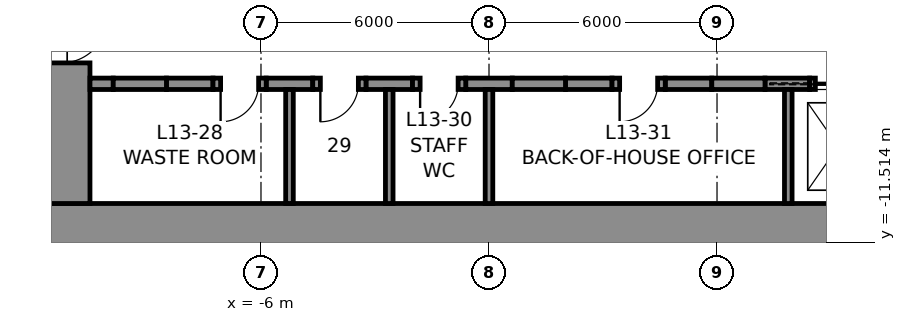
"""IFC4 building model, lengths in metres.
Left out: names, types, materials, properties, quantities, classifications, styles, units other than length and angle.
Written with IfcOpenShell. Run it as: python <this file> out.ifc"""

import sys

from ifc_helpers import new_model, si_unit, direction, frame, frame_2d, origin, place, context, subcontext, project, spatial, rectangle, extrude, element, fill, save


model = new_model("IFC4")
c1 = context("Model", 3, precision=1e-05, world=origin(), true_north=direction((0.0, 1.0)))
c2 = subcontext(c1, "Body", "Model", "MODEL_VIEW")
j1 = project(units=[si_unit("LENGTHUNIT", "METRE"), si_unit("PLANEANGLEUNIT", "RADIAN")], contexts=[c1])
p1 = place(None, origin())
s1 = spatial("IfcSite", under=j1, at=p1, CompositionType="ELEMENT")
p2 = place(p1, origin())
s2 = spatial("IfcBuilding", under=s1, at=p2, CompositionType="ELEMENT")
p3 = place(p2, frame((0.0, 0.0, 70.5)))
s3 = spatial("IfcBuildingStorey", under=s2, at=p3, CompositionType="ELEMENT", Elevation=70.5)
p4 = place(p3, frame((12.0, -11.25, 0.0), z_axis=(0.0, 0.0, 1.0), x_axis=(-1.0, 0.0, 0.0)))
e1 = element("IfcWall", 1, at=p4, inside=s3, PredefinedType="SHEAR", context=c2, shape_type="SweptSolid", body=[
    extrude(rectangle(XDim=24.0, YDim=1.5, at=frame_2d((12.0, 0.0))), origin(), (0.0, 0.0, 1.0), 5.5),
])
p5 = place(p3, frame((-11.25, -10.5, 0.0), z_axis=(0.0, 0.0, 1.0), x_axis=(0.0, 1.0, 0.0)))
e2 = element("IfcWall", 2, at=p5, inside=s3, PredefinedType="SHEAR", context=c2, shape_type="SweptSolid", body=[
    extrude(rectangle(XDim=21.0, YDim=1.5, at=frame_2d((10.5, 0.0))), origin(), (0.0, 0.0, 1.0), 5.5),
])
p6 = place(p5, frame((16.1, 0.0, 0.0)))
e3 = element("IfcOpeningElement", 3, at=p6, cuts=e2, PredefinedType="OPENING", context=c2, shape_type="SweptSolid", body=[
    extrude(rectangle(XDim=1.2, YDim=2.3, at=frame_2d((0.6, 1.15))), frame((0.0, 0.76, 0.0), z_axis=(0.0, -1.0, 0.0), x_axis=(1.0, 0.0, 0.0)), (0.0, 0.0, 1.0), 1.52),
])
p7 = place(p5, frame((3.7, 0.0, 0.0)))
e4 = element("IfcOpeningElement", 4, at=p7, cuts=e2, PredefinedType="OPENING", context=c2, shape_type="SweptSolid", body=[
    extrude(rectangle(XDim=1.2, YDim=2.3, at=frame_2d((0.6, 1.15))), frame((0.0, 0.76, 0.0), z_axis=(0.0, -1.0, 0.0), x_axis=(1.0, 0.0, 0.0)), (0.0, 0.0, 1.0), 1.52),
])
p8 = place(p3, frame((-10.5, -7.35, 0.0), z_axis=(0.0, 0.0, 1.0), x_axis=(1.0, 0.0, 0.0)))
e5 = element("IfcWall", 5, at=p8, inside=s3, PredefinedType="SHEAR", context=c2, shape_type="SweptSolid", body=[
    extrude(rectangle(XDim=0.613, YDim=0.3, at=frame_2d((0.306, 0.0))), origin(), (0.0, 0.0, 1.0), 5.5),
])
for number, where, z_axis, x_axis in (
    (6, (-8.488, -7.35, 0.0), (0.0, 0.0, 1.0), (1.0, 0.0, 0.0)),
    (7, (-5.863, -7.35, 0.0), (0.0, 0.0, 1.0), (1.0, 0.0, 0.0)),
    (8, (-3.238, -7.35, 0.0), (0.0, 0.0, 1.0), (1.0, 0.0, 0.0)),
    (9, (-0.613, -7.35, 0.0), (0.0, 0.0, 1.0), (1.0, 0.0, 0.0)),
    (10, (2.012, -7.35, 0.0), (0.0, 0.0, 1.0), (1.0, 0.0, 0.0)),
    (11, (4.637, -7.35, 0.0), (0.0, 0.0, 1.0), (1.0, 0.0, 0.0)),
):
    element("IfcWall", number, at=place(p3, frame(where, z_axis=z_axis, x_axis=x_axis)), inside=s3, PredefinedType="SHEAR", context=c2, shape_type="SweptSolid", body=[
        extrude(rectangle(XDim=1.225, YDim=0.3, at=frame_2d((0.613, 0.0))), origin(), (0.0, 0.0, 1.0), 5.5),
    ])
p9 = place(p3, frame((7.262, -7.35, 0.0), z_axis=(0.0, 0.0, 1.0), x_axis=(1.0, 0.0, 0.0)))
e12 = element("IfcWall", 12, at=p9, inside=s3, PredefinedType="SHEAR", context=c2, shape_type="SweptSolid", body=[
    extrude(rectangle(XDim=1.175, YDim=0.3, at=frame_2d((0.587, 0.0))), origin(), (0.0, 0.0, 1.0), 5.5),
])
p10 = place(p3, frame((-9.887, -7.35, 0.0), z_axis=(0.0, 0.0, 1.0), x_axis=(1.0, 0.0, 0.0)))
e13 = element("IfcWall", 13, at=p10, inside=s3, PredefinedType="PARTITIONING", context=c2, shape_type="SweptSolid", body=[
    extrude(rectangle(XDim=1.4, YDim=0.3, at=frame_2d((0.7, 0.0))), origin(), (0.0, 0.0, 1.0), 5.5),
])
p11 = place(p3, frame((-7.262, -7.35, 0.0), z_axis=(0.0, 0.0, 1.0), x_axis=(1.0, 0.0, 0.0)))
e14 = element("IfcWall", 14, at=p11, inside=s3, PredefinedType="PARTITIONING", context=c2, shape_type="SweptSolid", body=[
    extrude(rectangle(XDim=1.4, YDim=0.3, at=frame_2d((0.7, 0.0))), origin(), (0.0, 0.0, 1.0), 5.5),
])
p12 = place(p11, frame((0.2, 0.0, 0.0)))
e15 = element("IfcOpeningElement", 15, at=p12, cuts=e14, PredefinedType="OPENING", context=c2, shape_type="SweptSolid", body=[
    extrude(rectangle(XDim=1.0, YDim=2.3, at=frame_2d((0.5, 1.15))), frame((0.0, 0.16, 0.0), z_axis=(0.0, -1.0, 0.0), x_axis=(1.0, 0.0, 0.0)), (0.0, 0.0, 1.0), 0.32),
])
p13 = place(p3, frame((-4.637, -7.35, 0.0), z_axis=(0.0, 0.0, 1.0), x_axis=(1.0, 0.0, 0.0)))
e16 = element("IfcWall", 16, at=p13, inside=s3, PredefinedType="PARTITIONING", context=c2, shape_type="SweptSolid", body=[
    extrude(rectangle(XDim=1.4, YDim=0.3, at=frame_2d((0.7, 0.0))), origin(), (0.0, 0.0, 1.0), 5.5),
])
p14 = place(p13, frame((0.2, 0.0, 0.0)))
e17 = element("IfcOpeningElement", 17, at=p14, cuts=e16, PredefinedType="OPENING", context=c2, shape_type="SweptSolid", body=[
    extrude(rectangle(XDim=1.0, YDim=2.3, at=frame_2d((0.5, 1.15))), frame((0.0, 0.16, 0.0), z_axis=(0.0, -1.0, 0.0), x_axis=(1.0, 0.0, 0.0)), (0.0, 0.0, 1.0), 0.32),
])
p15 = place(p3, frame((-2.012, -7.35, 0.0), z_axis=(0.0, 0.0, 1.0), x_axis=(1.0, 0.0, 0.0)))
e18 = element("IfcWall", 18, at=p15, inside=s3, PredefinedType="PARTITIONING", context=c2, shape_type="SweptSolid", body=[
    extrude(rectangle(XDim=1.4, YDim=0.3, at=frame_2d((0.7, 0.0))), origin(), (0.0, 0.0, 1.0), 5.5),
])
p16 = place(p15, frame((0.2, 0.0, 0.0)))
e19 = element("IfcOpeningElement", 19, at=p16, cuts=e18, PredefinedType="OPENING", context=c2, shape_type="SweptSolid", body=[
    extrude(rectangle(XDim=1.0, YDim=2.3, at=frame_2d((0.5, 1.15))), frame((0.0, 0.16, 0.0), z_axis=(0.0, -1.0, 0.0), x_axis=(1.0, 0.0, 0.0)), (0.0, 0.0, 1.0), 0.32),
])
p17 = place(p3, frame((0.613, -7.35, 0.0), z_axis=(0.0, 0.0, 1.0), x_axis=(1.0, 0.0, 0.0)))
e20 = element("IfcWall", 20, at=p17, inside=s3, PredefinedType="PARTITIONING", context=c2, shape_type="SweptSolid", body=[
    extrude(rectangle(XDim=1.4, YDim=0.3, at=frame_2d((0.7, 0.0))), origin(), (0.0, 0.0, 1.0), 5.5),
])
p18 = place(p3, frame((3.238, -7.35, 0.0), z_axis=(0.0, 0.0, 1.0), x_axis=(1.0, 0.0, 0.0)))
e21 = element("IfcWall", 21, at=p18, inside=s3, PredefinedType="PARTITIONING", context=c2, shape_type="SweptSolid", body=[
    extrude(rectangle(XDim=1.4, YDim=0.3, at=frame_2d((0.7, 0.0))), origin(), (0.0, 0.0, 1.0), 5.5),
])
p19 = place(p18, frame((0.2, 0.0, 0.0)))
e22 = element("IfcOpeningElement", 22, at=p19, cuts=e21, PredefinedType="OPENING", context=c2, shape_type="SweptSolid", body=[
    extrude(rectangle(XDim=1.0, YDim=2.3, at=frame_2d((0.5, 1.15))), frame((0.0, 0.16, 0.0), z_axis=(0.0, -1.0, 0.0), x_axis=(1.0, 0.0, 0.0)), (0.0, 0.0, 1.0), 0.32),
])
p20 = place(p3, frame((5.863, -7.35, 0.0), z_axis=(0.0, 0.0, 1.0), x_axis=(1.0, 0.0, 0.0)))
e23 = element("IfcWall", 23, at=p20, inside=s3, PredefinedType="PARTITIONING", context=c2, shape_type="SweptSolid", body=[
    extrude(rectangle(XDim=1.4, YDim=0.3, at=frame_2d((0.7, 0.0))), origin(), (0.0, 0.0, 1.0), 5.5),
])
p21 = place(p3, frame((8.438, -7.35, 0.0), z_axis=(0.0, 0.0, 1.0), x_axis=(1.0, 0.0, 0.0)))
e24 = element("IfcWall", 24, at=p21, inside=s3, PredefinedType="PARTITIONING", context=c2, shape_type="SweptSolid", body=[
    extrude(rectangle(XDim=1.5, YDim=0.3, at=frame_2d((0.75, 0.0))), origin(), (0.0, 0.0, 1.0), 5.5),
])
p22 = place(p21, frame((0.15, 0.0, 0.0)))
e25 = element("IfcOpeningElement", 25, at=p22, cuts=e24, PredefinedType="OPENING", context=c2, shape_type="SweptSolid", body=[
    extrude(rectangle(XDim=1.2, YDim=2.3, at=frame_2d((0.6, 1.15))), frame((0.0, 0.16, 0.0), z_axis=(0.0, -1.0, 0.0), x_axis=(1.0, 0.0, 0.0)), (0.0, 0.0, 1.0), 0.32),
])
for number, where, z_axis, x_axis in (
    (26, (-5.25, -10.5, 0.0), (0.0, 0.0, 1.0), (0.0, 1.0, 0.0)),
    (27, (-2.625, -10.5, 0.0), (0.0, 0.0, 1.0), (0.0, 1.0, 0.0)),
    (28, (0.0, -10.5, 0.0), (0.0, 0.0, 1.0), (0.0, 1.0, 0.0)),
    (29, (7.875, -10.5, 0.0), (0.0, 0.0, 1.0), (0.0, 1.0, 0.0)),
):
    element("IfcWall", number, at=place(p3, frame(where, z_axis=z_axis, x_axis=x_axis)), inside=s3, PredefinedType="PARTITIONING", context=c2, shape_type="SweptSolid", body=[
        extrude(rectangle(XDim=3.0, YDim=0.2, at=frame_2d((1.5, 0.0))), origin(), (0.0, 0.0, 1.0), 5.5),
    ])
p23 = place(p12, frame((1.0, 0.0, 0.0), z_axis=(0.0, 0.0, 1.0), x_axis=(-1.0, 0.0, 0.0)))
e30 = element("IfcDoor", 30, at=p23, inside=s3, OperationType="SINGLE_SWING_RIGHT", PredefinedType="DOOR", context=c2, shape_type="SweptSolid", body=[
    extrude(rectangle(XDim=1.0, YDim=2.3, at=frame_2d((0.5, 1.15))), frame((0.0, 0.025, 0.0), z_axis=(0.0, -1.0, 0.0), x_axis=(1.0, 0.0, 0.0)), (0.0, 0.0, 1.0), 0.05),
])
fill(e15, e30)
p24 = place(p14, frame((1.0, 0.0, 0.0), z_axis=(0.0, 0.0, 1.0), x_axis=(-1.0, 0.0, 0.0)))
e31 = element("IfcDoor", 31, at=p24, inside=s3, OperationType="SINGLE_SWING_RIGHT", PredefinedType="DOOR", context=c2, shape_type="SweptSolid", body=[
    extrude(rectangle(XDim=1.0, YDim=2.3, at=frame_2d((0.5, 1.15))), frame((0.0, 0.025, 0.0), z_axis=(0.0, -1.0, 0.0), x_axis=(1.0, 0.0, 0.0)), (0.0, 0.0, 1.0), 0.05),
])
fill(e17, e31)
p25 = place(p16, frame((1.0, 0.0, 0.0), z_axis=(0.0, 0.0, 1.0), x_axis=(-1.0, 0.0, 0.0)))
e32 = element("IfcDoor", 32, at=p25, inside=s3, OperationType="SINGLE_SWING_RIGHT", PredefinedType="DOOR", context=c2, shape_type="SweptSolid", body=[
    extrude(rectangle(XDim=1.0, YDim=2.3, at=frame_2d((0.5, 1.15))), frame((0.0, 0.025, 0.0), z_axis=(0.0, -1.0, 0.0), x_axis=(1.0, 0.0, 0.0)), (0.0, 0.0, 1.0), 0.05),
])
fill(e19, e32)
p26 = place(p19, frame((1.0, 0.0, 0.0), z_axis=(0.0, 0.0, 1.0), x_axis=(-1.0, 0.0, 0.0)))
e33 = element("IfcDoor", 33, at=p26, inside=s3, OperationType="SINGLE_SWING_RIGHT", PredefinedType="DOOR", context=c2, shape_type="SweptSolid", body=[
    extrude(rectangle(XDim=1.0, YDim=2.3, at=frame_2d((0.5, 1.15))), frame((0.0, 0.025, 0.0), z_axis=(0.0, -1.0, 0.0), x_axis=(1.0, 0.0, 0.0)), (0.0, 0.0, 1.0), 0.05),
])
fill(e22, e33)
p27 = place(p7, frame((1.2, 0.0, 0.0), z_axis=(0.0, 0.0, 1.0), x_axis=(-1.0, 0.0, 0.0)))
e34 = element("IfcDoor", 34, at=p27, inside=s3, OperationType="SINGLE_SWING_LEFT", PredefinedType="DOOR", context=c2, shape_type="SweptSolid", body=[
    extrude(rectangle(XDim=1.2, YDim=2.3, at=frame_2d((0.6, 1.15))), frame((0.0, 0.025, 0.0), z_axis=(0.0, -1.0, 0.0), x_axis=(1.0, 0.0, 0.0)), (0.0, 0.0, 1.0), 0.05),
])
fill(e4, e34)
p28 = place(p22, origin())
e35 = element("IfcDoor", 35, at=p28, inside=s3, OperationType="SLIDING_TO_LEFT", PredefinedType="DOOR", context=c2, shape_type="SweptSolid", body=[
    extrude(rectangle(XDim=1.2, YDim=2.3, at=frame_2d((0.6, 1.15))), frame((0.0, 0.025, 0.0), z_axis=(0.0, -1.0, 0.0), x_axis=(1.0, 0.0, 0.0)), (0.0, 0.0, 1.0), 0.05),
])
fill(e25, e35)
save(model, sys.argv[1])
